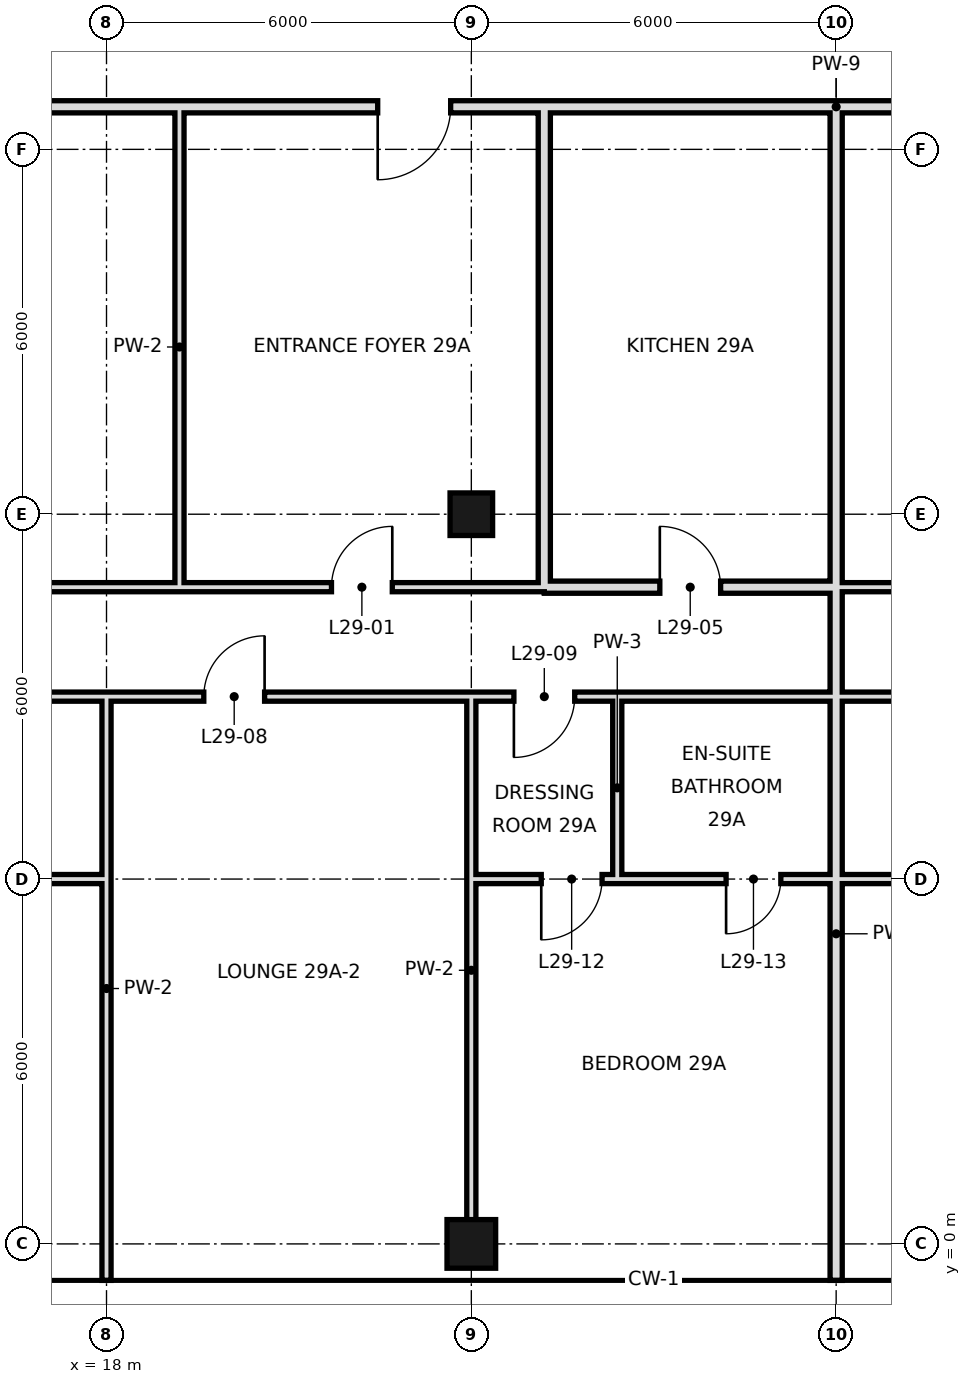
"""IFC4 building model, lengths in metres.
Left out: names, types, materials, properties, quantities, classifications, styles, units other than length and angle.
Written with IfcOpenShell. Run it as: python <this file> out.ifc"""

import sys

from ifc_helpers import new_model, si_unit, direction, frame, frame_2d, origin, origin_2d, place, context, subcontext, project, spatial, rectangle, hollow_rectangle, extrude, element, fill, save


model = new_model("IFC4")
c1 = context("Model", 3, precision=1e-05, world=origin(), true_north=direction((0.0, 1.0)))
c2 = subcontext(c1, "Body", "Model", "MODEL_VIEW")
j1 = project(units=[si_unit("LENGTHUNIT", "METRE"), si_unit("PLANEANGLEUNIT", "RADIAN")], contexts=[c1])
p1 = place(None, origin())
s1 = spatial("IfcSite", under=j1, at=p1, CompositionType="ELEMENT")
p2 = place(p1, origin())
s2 = spatial("IfcBuilding", under=s1, at=p2, CompositionType="ELEMENT")
p3 = place(p2, frame((0.0, 0.0, 130.4)))
s3 = spatial("IfcBuildingStorey", under=s2, at=p3, CompositionType="ELEMENT", Elevation=130.4)
p4 = place(p3, frame((24.0, 0.0, 0.0), z_axis=(0.0, 0.0, 1.0), x_axis=(1.0, 0.0, 0.0)))
e1 = element("IfcColumn", 1, at=p4, inside=s3, PredefinedType="COLUMN", context=c2, shape_type="SweptSolid", body=[
    extrude(hollow_rectangle(XDim=0.8, YDim=0.8, WallThickness=0.04, at=origin_2d()), origin(), (0.0, 0.0, 1.0), 3.6),
])
p5 = place(p3, frame((24.0, 12.0, 0.0), z_axis=(0.0, 0.0, 1.0), x_axis=(1.0, 0.0, 0.0)))
e2 = element("IfcColumn", 2, at=p5, inside=s3, PredefinedType="COLUMN", context=c2, shape_type="SweptSolid", body=[
    extrude(hollow_rectangle(XDim=0.7, YDim=0.7, WallThickness=0.036, at=origin_2d()), origin(), (0.0, 0.0, 1.0), 3.6),
])
p6 = place(p3, frame((18.0, -0.6, 0.0), z_axis=(0.0, 0.0, 1.0), x_axis=(0.0, 1.0, 0.0)))
e3 = element("IfcWall", 3, at=p6, inside=s3, PredefinedType="PARTITIONING", context=c2, shape_type="SweptSolid", body=[
    extrude(rectangle(XDim=9.6, YDim=0.15, at=frame_2d((4.8, 0.0))), origin(), (0.0, 0.0, 1.0), 2.72),
])
p7 = place(p3, frame((19.2, 10.8, 0.0), z_axis=(0.0, 0.0, 1.0), x_axis=(0.0, 1.0, 0.0)))
e4 = element("IfcWall", 4, at=p7, inside=s3, PredefinedType="PARTITIONING", context=c2, shape_type="SweptSolid", body=[
    extrude(rectangle(XDim=7.9, YDim=0.15, at=frame_2d((3.95, 0.0))), origin(), (0.0, 0.0, 1.0), 3.42),
])
p8 = place(p3, frame((24.0, 0.0, 0.0), z_axis=(0.0, 0.0, 1.0), x_axis=(0.0, 1.0, 0.0)))
e5 = element("IfcWall", 5, at=p8, inside=s3, PredefinedType="PARTITIONING", context=c2, shape_type="SweptSolid", body=[
    extrude(rectangle(XDim=9.0, YDim=0.15, at=frame_2d((4.5, 0.0))), origin(), (0.0, 0.0, 1.0), 2.72),
])
p9 = place(p3, frame((25.2, 10.8, 0.0), z_axis=(0.0, 0.0, 1.0), x_axis=(0.0, 1.0, 0.0)))
e6 = element("IfcWall", 6, at=p9, inside=s3, PredefinedType="SOLIDWALL", context=c2, shape_type="SweptSolid", body=[
    extrude(rectangle(XDim=7.9, YDim=0.2, at=frame_2d((3.95, 0.0))), origin(), (0.0, 0.0, 1.0), 2.72),
])
p10 = place(p3, frame((26.4, 6.0, 0.0), z_axis=(0.0, 0.0, 1.0), x_axis=(0.0, 1.0, 0.0)))
e7 = element("IfcWall", 7, at=p10, inside=s3, PredefinedType="PARTITIONING", context=c2, shape_type="SweptSolid", body=[
    extrude(rectangle(XDim=3.0, YDim=0.15, at=frame_2d((1.5, 0.0))), origin(), (0.0, 0.0, 1.0), 3.42),
])
p11 = place(p3, frame((30.0, 10.8, 0.0), z_axis=(0.0, 0.0, 1.0), x_axis=(0.0, 1.0, 0.0)))
e8 = element("IfcWall", 8, at=p11, inside=s3, PredefinedType="SOLIDWALL", context=c2, shape_type="SweptSolid", body=[
    extrude(rectangle(XDim=7.9, YDim=0.2, at=frame_2d((3.95, 0.0))), origin(), (0.0, 0.0, 1.0), 2.72),
])
p12 = place(p3, frame((30.0, -0.6, 0.0), z_axis=(0.0, 0.0, 1.0), x_axis=(0.0, 1.0, 0.0)))
e9 = element("IfcWall", 9, at=p12, inside=s3, PredefinedType="SOLIDWALL", context=c2, shape_type="SweptSolid", body=[
    extrude(rectangle(XDim=11.4, YDim=0.2, at=frame_2d((5.7, 0.0))), origin(), (0.0, 0.0, 1.0), 2.72),
])
p13 = place(p3, frame((25.2, 10.8, 0.0), z_axis=(0.0, 0.0, 1.0), x_axis=(1.0, 0.0, 0.0)))
e10 = element("IfcWall", 10, at=p13, inside=s3, PredefinedType="SOLIDWALL", context=c2, shape_type="SweptSolid", body=[
    extrude(rectangle(XDim=4.8, YDim=0.2, at=frame_2d((2.4, 0.0))), origin(), (0.0, 0.0, 1.0), 2.72),
])
p14 = place(p13, frame((1.9, 0.0, 0.0)))
e11 = element("IfcOpeningElement", 11, at=p14, cuts=e10, PredefinedType="OPENING", context=c2, shape_type="SweptSolid", body=[
    extrude(rectangle(XDim=1.0, YDim=2.4, at=frame_2d((0.5, 1.2))), frame((0.0, 0.11, 0.0), z_axis=(0.0, -1.0, 0.0), x_axis=(1.0, 0.0, 0.0)), (0.0, 0.0, 1.0), 0.22),
])
p15 = place(p3, frame((7.2, 10.8, 0.0), z_axis=(0.0, 0.0, 1.0), x_axis=(1.0, 0.0, 0.0)))
e12 = element("IfcWall", 12, at=p15, inside=s3, PredefinedType="PARTITIONING", context=c2, shape_type="SweptSolid", body=[
    extrude(rectangle(XDim=18.0, YDim=0.15, at=frame_2d((9.0, 0.0))), origin(), (0.0, 0.0, 1.0), 3.42),
])
p16 = place(p15, frame((14.5, 0.0, 0.0)))
e13 = element("IfcOpeningElement", 13, at=p16, cuts=e12, PredefinedType="OPENING", context=c2, shape_type="SweptSolid", body=[
    extrude(rectangle(XDim=1.0, YDim=2.4, at=frame_2d((0.5, 1.2))), frame((0.0, 0.085, 0.0), z_axis=(0.0, -1.0, 0.0), x_axis=(1.0, 0.0, 0.0)), (0.0, 0.0, 1.0), 0.17),
])
p17 = place(p15, frame((5.5, 0.0, 0.0)))
e14 = element("IfcOpeningElement", 14, at=p17, cuts=e12, PredefinedType="OPENING", context=c2, shape_type="SweptSolid", body=[
    extrude(rectangle(XDim=1.0, YDim=2.4, at=frame_2d((0.5, 1.2))), frame((0.0, 0.085, 0.0), z_axis=(0.0, -1.0, 0.0), x_axis=(1.0, 0.0, 0.0)), (0.0, 0.0, 1.0), 0.17),
])
p18 = place(p3, frame((30.0, 10.8, 0.0), z_axis=(0.0, 0.0, 1.0), x_axis=(1.0, 0.0, 0.0)))
e15 = element("IfcWall", 15, at=p18, inside=s3, PredefinedType="PARTITIONING", context=c2, shape_type="SweptSolid", body=[
    extrude(rectangle(XDim=11.4, YDim=0.15, at=frame_2d((5.7, 0.0))), origin(), (0.0, 0.0, 1.0), 3.42),
])
p19 = place(p18, frame((9.1, 0.0, 0.0)))
e16 = element("IfcOpeningElement", 16, at=p19, cuts=e15, PredefinedType="OPENING", context=c2, shape_type="SweptSolid", body=[
    extrude(rectangle(XDim=1.0, YDim=2.4, at=frame_2d((0.5, 1.2))), frame((0.0, 0.085, 0.0), z_axis=(0.0, -1.0, 0.0), x_axis=(1.0, 0.0, 0.0)), (0.0, 0.0, 1.0), 0.17),
])
p20 = place(p18, frame((3.4, 0.0, 0.0)))
e17 = element("IfcOpeningElement", 17, at=p20, cuts=e15, PredefinedType="OPENING", context=c2, shape_type="SweptSolid", body=[
    extrude(rectangle(XDim=1.0, YDim=2.4, at=frame_2d((0.5, 1.2))), frame((0.0, 0.085, 0.0), z_axis=(0.0, -1.0, 0.0), x_axis=(1.0, 0.0, 0.0)), (0.0, 0.0, 1.0), 0.17),
])
p21 = place(p3, frame((3.1, 18.7, 0.0), z_axis=(0.0, 0.0, 1.0), x_axis=(1.0, 0.0, 0.0)))
e18 = element("IfcWall", 18, at=p21, inside=s3, PredefinedType="SOLIDWALL", context=c2, shape_type="SweptSolid", body=[
    extrude(rectangle(XDim=22.1, YDim=0.2, at=frame_2d((11.05, 0.0))), origin(), (0.0, 0.0, 1.0), 2.72),
])
p22 = place(p21, frame((19.36, 0.0, 0.0)))
e19 = element("IfcOpeningElement", 19, at=p22, cuts=e18, PredefinedType="OPENING", context=c2, shape_type="SweptSolid", body=[
    extrude(rectangle(XDim=1.2, YDim=2.4, at=frame_2d((0.6, 1.2))), frame((0.0, 0.11, 0.0), z_axis=(0.0, -1.0, 0.0), x_axis=(1.0, 0.0, 0.0)), (0.0, 0.0, 1.0), 0.22),
])
p23 = place(p3, frame((30.0, 18.7, 0.0), z_axis=(0.0, 0.0, 1.0), x_axis=(1.0, 0.0, 0.0)))
e20 = element("IfcWall", 20, at=p23, inside=s3, PredefinedType="SOLIDWALL", context=c2, shape_type="SweptSolid", body=[
    extrude(rectangle(XDim=13.8, YDim=0.2, at=frame_2d((6.9, 0.0))), origin(), (0.0, 0.0, 1.0), 2.72),
])
p24 = place(p23, frame((8.62, 0.0, 0.0)))
e21 = element("IfcOpeningElement", 21, at=p24, cuts=e20, PredefinedType="OPENING", context=c2, shape_type="SweptSolid", body=[
    extrude(rectangle(XDim=1.2, YDim=2.4, at=frame_2d((0.6, 1.2))), frame((0.0, 0.11, 0.0), z_axis=(0.0, -1.0, 0.0), x_axis=(1.0, 0.0, 0.0)), (0.0, 0.0, 1.0), 0.22),
])
p25 = place(p3, frame((25.2, 18.7, 0.0), z_axis=(0.0, 0.0, 1.0), x_axis=(1.0, 0.0, 0.0)))
e22 = element("IfcWall", 22, at=p25, inside=s3, PredefinedType="SOLIDWALL", context=c2, shape_type="SweptSolid", body=[
    extrude(rectangle(XDim=4.8, YDim=0.2, at=frame_2d((2.4, 0.0))), origin(), (0.0, 0.0, 1.0), 2.72),
])
p26 = place(p3, frame((-6.0, 6.0, 0.0), z_axis=(0.0, 0.0, 1.0), x_axis=(1.0, 0.0, 0.0)))
e23 = element("IfcWall", 23, at=p26, inside=s3, PredefinedType="PARTITIONING", context=c2, shape_type="SweptSolid", body=[
    extrude(rectangle(XDim=24.0, YDim=0.15, at=frame_2d((12.0, 0.0))), origin(), (0.0, 0.0, 1.0), 2.97),
])
p27 = place(p26, frame((5.5, 0.0, 0.0)))
e24 = element("IfcOpeningElement", 24, at=p27, cuts=e23, PredefinedType="OPENING", context=c2, shape_type="SweptSolid", body=[
    extrude(rectangle(XDim=1.0, YDim=2.4, at=frame_2d((0.5, 1.2))), frame((0.0, 0.085, 0.0), z_axis=(0.0, -1.0, 0.0), x_axis=(1.0, 0.0, 0.0)), (0.0, 0.0, 1.0), 0.17),
])
p28 = place(p26, frame((17.1, 0.0, 0.0)))
e25 = element("IfcOpeningElement", 25, at=p28, cuts=e23, PredefinedType="OPENING", context=c2, shape_type="SweptSolid", body=[
    extrude(rectangle(XDim=1.8, YDim=2.4, at=frame_2d((0.9, 1.2))), frame((0.0, 0.085, 0.0), z_axis=(0.0, -1.0, 0.0), x_axis=(1.0, 0.0, 0.0)), (0.0, 0.0, 1.0), 0.17),
])
p29 = place(p3, frame((24.0, 6.0, 0.0), z_axis=(0.0, 0.0, 1.0), x_axis=(1.0, 0.0, 0.0)))
e26 = element("IfcWall", 26, at=p29, inside=s3, PredefinedType="PARTITIONING", context=c2, shape_type="SweptSolid", body=[
    extrude(rectangle(XDim=2.4, YDim=0.15, at=frame_2d((1.2, 0.0))), origin(), (0.0, 0.0, 1.0), 2.97),
])
p30 = place(p29, frame((1.15, 0.0, 0.0)))
e27 = element("IfcOpeningElement", 27, at=p30, cuts=e26, PredefinedType="OPENING", context=c2, shape_type="SweptSolid", body=[
    extrude(rectangle(XDim=1.0, YDim=2.4, at=frame_2d((0.5, 1.2))), frame((0.0, 0.085, 0.0), z_axis=(0.0, -1.0, 0.0), x_axis=(1.0, 0.0, 0.0)), (0.0, 0.0, 1.0), 0.17),
])
p31 = place(p3, frame((30.0, 6.0, 0.0), z_axis=(0.0, 0.0, 1.0), x_axis=(1.0, 0.0, 0.0)))
e28 = element("IfcWall", 28, at=p31, inside=s3, PredefinedType="PARTITIONING", context=c2, shape_type="SweptSolid", body=[
    extrude(rectangle(XDim=12.0, YDim=0.15, at=frame_2d((6.0, 0.0))), origin(), (0.0, 0.0, 1.0), 2.72),
])
p32 = place(p31, frame((3.16, 0.0, 0.0)))
e29 = element("IfcOpeningElement", 29, at=p32, cuts=e28, PredefinedType="OPENING", context=c2, shape_type="SweptSolid", body=[
    extrude(rectangle(XDim=1.8, YDim=2.4, at=frame_2d((0.9, 1.2))), frame((0.0, 0.085, 0.0), z_axis=(0.0, -1.0, 0.0), x_axis=(1.0, 0.0, 0.0)), (0.0, 0.0, 1.0), 0.17),
])
p33 = place(p3, frame((26.4, 6.0, 0.0), z_axis=(0.0, 0.0, 1.0), x_axis=(1.0, 0.0, 0.0)))
e30 = element("IfcWall", 30, at=p33, inside=s3, PredefinedType="PARTITIONING", context=c2, shape_type="SweptSolid", body=[
    extrude(rectangle(XDim=3.6, YDim=0.15, at=frame_2d((1.8, 0.0))), origin(), (0.0, 0.0, 1.0), 2.97),
])
p34 = place(p33, frame((1.79, 0.0, 0.0)))
e31 = element("IfcOpeningElement", 31, at=p34, cuts=e30, PredefinedType="OPENING", context=c2, shape_type="SweptSolid", body=[
    extrude(rectangle(XDim=0.9, YDim=2.4, at=frame_2d((0.45, 1.2))), frame((0.0, 0.085, 0.0), z_axis=(0.0, -1.0, 0.0), x_axis=(1.0, 0.0, 0.0)), (0.0, 0.0, 1.0), 0.17),
])
p35 = place(p3, frame((-6.6, 9.0, 0.0), z_axis=(0.0, 0.0, 1.0), x_axis=(1.0, 0.0, 0.0)))
e32 = element("IfcWall", 32, at=p35, inside=s3, PredefinedType="PARTITIONING", context=c2, shape_type="SweptSolid", body=[
    extrude(rectangle(XDim=33.0, YDim=0.15, at=frame_2d((16.5, 0.0))), origin(), (0.0, 0.0, 1.0), 3.42),
])
p36 = place(p35, frame((8.2, 0.0, 0.0)))
e33 = element("IfcOpeningElement", 33, at=p36, cuts=e32, PredefinedType="OPENING", context=c2, shape_type="SweptSolid", body=[
    extrude(rectangle(XDim=1.0, YDim=2.4, at=frame_2d((0.5, 1.2))), frame((0.0, 0.085, 0.0), z_axis=(0.0, -1.0, 0.0), x_axis=(1.0, 0.0, 0.0)), (0.0, 0.0, 1.0), 0.17),
])
p37 = place(p35, frame((17.7, 0.0, 0.0)))
e34 = element("IfcOpeningElement", 34, at=p37, cuts=e32, PredefinedType="OPENING", context=c2, shape_type="SweptSolid", body=[
    extrude(rectangle(XDim=1.8, YDim=2.4, at=frame_2d((0.9, 1.2))), frame((0.0, 0.085, 0.0), z_axis=(0.0, -1.0, 0.0), x_axis=(1.0, 0.0, 0.0)), (0.0, 0.0, 1.0), 0.17),
])
p38 = place(p35, frame((26.2, 0.0, 0.0)))
e35 = element("IfcOpeningElement", 35, at=p38, cuts=e32, PredefinedType="OPENING", context=c2, shape_type="SweptSolid", body=[
    extrude(rectangle(XDim=1.0, YDim=2.4, at=frame_2d((0.5, 1.2))), frame((0.0, 0.085, 0.0), z_axis=(0.0, -1.0, 0.0), x_axis=(1.0, 0.0, 0.0)), (0.0, 0.0, 1.0), 0.17),
])
p39 = place(p35, frame((31.3, 0.0, 0.0)))
e36 = element("IfcOpeningElement", 36, at=p39, cuts=e32, PredefinedType="OPENING", context=c2, shape_type="SweptSolid", body=[
    extrude(rectangle(XDim=1.0, YDim=2.4, at=frame_2d((0.5, 1.2))), frame((0.0, 0.085, 0.0), z_axis=(0.0, -1.0, 0.0), x_axis=(1.0, 0.0, 0.0)), (0.0, 0.0, 1.0), 0.17),
])
p40 = place(p3, frame((30.0, 9.0, 0.0), z_axis=(0.0, 0.0, 1.0), x_axis=(1.0, 0.0, 0.0)))
e37 = element("IfcWall", 37, at=p40, inside=s3, PredefinedType="PARTITIONING", context=c2, shape_type="SweptSolid", body=[
    extrude(rectangle(XDim=18.0, YDim=0.15, at=frame_2d((9.0, 0.0))), origin(), (0.0, 0.0, 1.0), 3.42),
])
p41 = place(p40, frame((7.04, 0.0, 0.0)))
e38 = element("IfcOpeningElement", 38, at=p41, cuts=e37, PredefinedType="OPENING", context=c2, shape_type="SweptSolid", body=[
    extrude(rectangle(XDim=1.8, YDim=2.4, at=frame_2d((0.9, 1.2))), frame((0.0, 0.085, 0.0), z_axis=(0.0, -1.0, 0.0), x_axis=(1.0, 0.0, 0.0)), (0.0, 0.0, 1.0), 0.17),
])
p42 = place(p40, frame((15.4, 0.0, 0.0)))
e39 = element("IfcOpeningElement", 39, at=p42, cuts=e37, PredefinedType="OPENING", context=c2, shape_type="SweptSolid", body=[
    extrude(rectangle(XDim=1.0, YDim=2.4, at=frame_2d((0.5, 1.2))), frame((0.0, 0.085, 0.0), z_axis=(0.0, -1.0, 0.0), x_axis=(1.0, 0.0, 0.0)), (0.0, 0.0, 1.0), 0.17),
])
p43 = place(p3, frame((26.4, 9.0, 0.0), z_axis=(0.0, 0.0, 1.0), x_axis=(1.0, 0.0, 0.0)))
e40 = element("IfcWall", 40, at=p43, inside=s3, PredefinedType="PARTITIONING", context=c2, shape_type="SweptSolid", body=[
    extrude(rectangle(XDim=3.6, YDim=0.15, at=frame_2d((1.8, 0.0))), origin(), (0.0, 0.0, 1.0), 3.42),
])
p44 = place(p16, frame((1.0, 0.0, 0.0), z_axis=(0.0, 0.0, 1.0), x_axis=(-1.0, 0.0, 0.0)))
e41 = element("IfcDoor", 41, at=p44, inside=s3, OperationType="SINGLE_SWING_LEFT", PredefinedType="DOOR", context=c2, shape_type="SweptSolid", body=[
    extrude(rectangle(XDim=1.0, YDim=2.4, at=frame_2d((0.5, 1.2))), frame((0.0, 0.025, 0.0), z_axis=(0.0, -1.0, 0.0), x_axis=(1.0, 0.0, 0.0)), (0.0, 0.0, 1.0), 0.05),
])
fill(e13, e41)
p45 = place(p14, origin())
e42 = element("IfcDoor", 42, at=p45, inside=s3, OperationType="SINGLE_SWING_LEFT", PredefinedType="DOOR", context=c2, shape_type="SweptSolid", body=[
    extrude(rectangle(XDim=1.0, YDim=2.4, at=frame_2d((0.5, 1.2))), frame((0.0, 0.025, 0.0), z_axis=(0.0, -1.0, 0.0), x_axis=(1.0, 0.0, 0.0)), (0.0, 0.0, 1.0), 0.05),
])
fill(e11, e42)
p46 = place(p38, frame((1.0, 0.0, 0.0), z_axis=(0.0, 0.0, 1.0), x_axis=(-1.0, 0.0, 0.0)))
e43 = element("IfcDoor", 43, at=p46, inside=s3, OperationType="SINGLE_SWING_LEFT", PredefinedType="DOOR", context=c2, shape_type="SweptSolid", body=[
    extrude(rectangle(XDim=1.0, YDim=2.4, at=frame_2d((0.5, 1.2))), frame((0.0, 0.025, 0.0), z_axis=(0.0, -1.0, 0.0), x_axis=(1.0, 0.0, 0.0)), (0.0, 0.0, 1.0), 0.05),
])
fill(e35, e43)
p47 = place(p39, frame((1.0, 0.0, 0.0), z_axis=(0.0, 0.0, 1.0), x_axis=(-1.0, 0.0, 0.0)))
e44 = element("IfcDoor", 44, at=p47, inside=s3, OperationType="SINGLE_SWING_RIGHT", PredefinedType="DOOR", context=c2, shape_type="SweptSolid", body=[
    extrude(rectangle(XDim=1.0, YDim=2.4, at=frame_2d((0.5, 1.2))), frame((0.0, 0.025, 0.0), z_axis=(0.0, -1.0, 0.0), x_axis=(1.0, 0.0, 0.0)), (0.0, 0.0, 1.0), 0.05),
])
fill(e36, e44)
p48 = place(p30, frame((1.0, 0.0, 0.0), z_axis=(0.0, 0.0, 1.0), x_axis=(-1.0, 0.0, 0.0)))
e45 = element("IfcDoor", 45, at=p48, inside=s3, OperationType="SINGLE_SWING_RIGHT", PredefinedType="DOOR", context=c2, shape_type="SweptSolid", body=[
    extrude(rectangle(XDim=1.0, YDim=2.4, at=frame_2d((0.5, 1.2))), frame((0.0, 0.025, 0.0), z_axis=(0.0, -1.0, 0.0), x_axis=(1.0, 0.0, 0.0)), (0.0, 0.0, 1.0), 0.05),
])
fill(e27, e45)
p49 = place(p34, frame((0.9, 0.0, 0.0), z_axis=(0.0, 0.0, 1.0), x_axis=(-1.0, 0.0, 0.0)))
e46 = element("IfcDoor", 46, at=p49, inside=s3, OperationType="SINGLE_SWING_RIGHT", PredefinedType="DOOR", context=c2, shape_type="SweptSolid", body=[
    extrude(rectangle(XDim=0.9, YDim=2.4, at=frame_2d((0.45, 1.2))), frame((0.0, 0.025, 0.0), z_axis=(0.0, -1.0, 0.0), x_axis=(1.0, 0.0, 0.0)), (0.0, 0.0, 1.0), 0.05),
])
fill(e31, e46)
p50 = place(p22, frame((1.2, 0.0, 0.0), z_axis=(0.0, 0.0, 1.0), x_axis=(-1.0, 0.0, 0.0)))
e47 = element("IfcDoor", 47, at=p50, inside=s3, OperationType="SINGLE_SWING_RIGHT", PredefinedType="DOOR", context=c2, shape_type="SweptSolid", body=[
    extrude(rectangle(XDim=1.2, YDim=2.4, at=frame_2d((0.6, 1.2))), frame((0.0, 0.025, 0.0), z_axis=(0.0, -1.0, 0.0), x_axis=(1.0, 0.0, 0.0)), (0.0, 0.0, 1.0), 0.05),
])
fill(e19, e47)
save(model, sys.argv[1])
